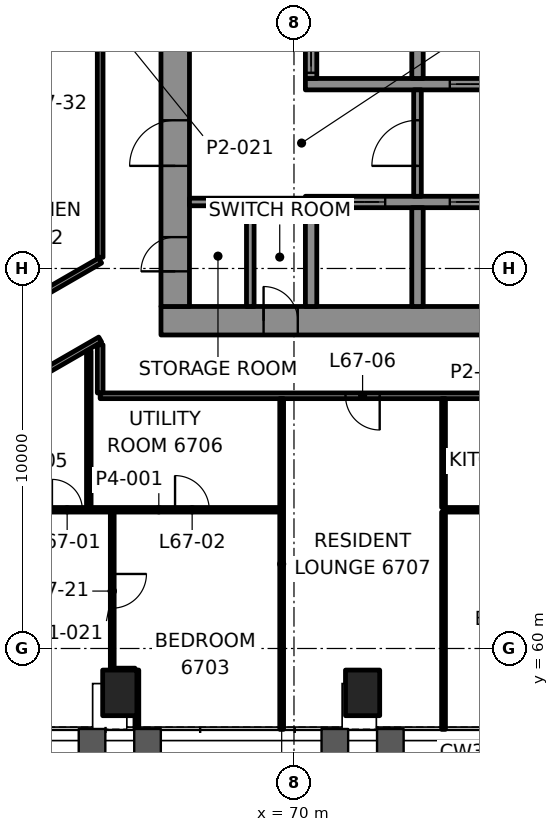
"""IFC4 building model, lengths in metres.
Left out: names, types, materials, properties, quantities, classifications, styles, units other than length and angle.
Written with IfcOpenShell. Run it as: python <this file> out.ifc"""

import sys

from ifc_helpers import new_model, si_unit, direction, frame, frame_2d, origin, origin_2d, place, context, subcontext, project, spatial, rectangle, hollow_rectangle, extrude, element, fill, save


model = new_model("IFC4")
c1 = context("Model", 3, precision=1e-05, world=origin(), true_north=direction((0.0, 1.0)))
c2 = subcontext(c1, "Body", "Model", "MODEL_VIEW")
j1 = project(units=[si_unit("LENGTHUNIT", "METRE"), si_unit("PLANEANGLEUNIT", "RADIAN")], contexts=[c1])
p1 = place(None, origin())
s1 = spatial("IfcSite", under=j1, at=p1, CompositionType="ELEMENT")
p2 = place(p1, origin())
s2 = spatial("IfcBuilding", under=s1, at=p2, CompositionType="ELEMENT")
p3 = place(p2, frame((0.0, 0.0, 281.1)))
s3 = spatial("IfcBuildingStorey", under=s2, at=p3, CompositionType="ELEMENT", Elevation=281.1)
for number, where, z_axis, x_axis in (
    (1, (65.416, 58.832, -0.0), (0.0, 0.0, 1.0), (1.0, 0.0, 0.0)),
    (2, (71.805, 58.832, -0.0), (0.0, 0.0, 1.0), (1.0, 0.0, 0.0)),
):
    element("IfcColumn", number, at=place(p3, frame(where, z_axis=z_axis, x_axis=x_axis)), inside=s3, PredefinedType="COLUMN", context=c2, shape_type="SweptSolid", body=[
        extrude(hollow_rectangle(XDim=0.9, YDim=1.2, WallThickness=0.06, at=origin_2d()), origin(), (0.0, 0.0, 1.0), 3.5),
    ])
p4 = place(p3, frame((66.5, 68.625, 0.0), z_axis=(0.0, 0.0, 1.0), x_axis=(1.0, 0.0, 0.0)))
e3 = element("IfcWall", 3, at=p4, inside=s3, PredefinedType="SHEAR", context=c2, shape_type="SweptSolid", body=[
    extrude(rectangle(XDim=17.0, YDim=0.75, at=frame_2d((8.5, 0.0))), origin(), (0.0, 0.0, 1.0), 3.3),
])
p5 = place(p4, frame((2.7, 0.0, 0.0)))
e4 = element("IfcOpeningElement", 4, at=p5, cuts=e3, PredefinedType="OPENING", context=c2, shape_type="SweptSolid", body=[
    extrude(rectangle(XDim=0.9, YDim=2.1, at=frame_2d((0.45, 1.05))), frame((0.0, 0.385, 0.0), z_axis=(0.0, -1.0, 0.0), x_axis=(1.0, 0.0, 0.0)), (0.0, 0.0, 1.0), 0.77),
])
p6 = place(p3, frame((66.875, 69.0, 0.0), z_axis=(0.0, 0.0, 1.0), x_axis=(0.0, 1.0, 0.0)))
e5 = element("IfcWall", 5, at=p6, inside=s3, PredefinedType="SHEAR", context=c2, shape_type="SweptSolid", body=[
    extrude(rectangle(XDim=12.0, YDim=0.75, at=frame_2d((6.0, 0.0))), origin(), (0.0, 0.0, 1.0), 3.3),
])
p7 = place(p6, frame((3.7, 0.0, 0.0)))
e6 = element("IfcOpeningElement", 6, at=p7, cuts=e5, PredefinedType="OPENING", context=c2, shape_type="SweptSolid", body=[
    extrude(rectangle(XDim=1.2, YDim=2.1, at=frame_2d((0.6, 1.05))), frame((0.0, 0.385, 0.0), z_axis=(0.0, -1.0, 0.0), x_axis=(1.0, 0.0, 0.0)), (0.0, 0.0, 1.0), 0.77),
])
p8 = place(p6, frame((0.925, 0.0, 0.0)))
e7 = element("IfcOpeningElement", 7, at=p8, cuts=e5, PredefinedType="OPENING", context=c2, shape_type="SweptSolid", body=[
    extrude(rectangle(XDim=0.9, YDim=2.1, at=frame_2d((0.45, 1.05))), frame((0.0, 0.385, 0.0), z_axis=(0.0, -1.0, 0.0), x_axis=(1.0, 0.0, 0.0)), (0.0, 0.0, 1.0), 0.77),
])
p9 = place(p3, frame((70.3, 71.75, 0.0), z_axis=(0.0, 0.0, 1.0), x_axis=(1.0, 0.0, 0.0)))
e8 = element("IfcWall", 8, at=p9, inside=s3, PredefinedType="SHEAR", context=c2, shape_type="SweptSolid", body=[
    extrude(rectangle(XDim=11.5, YDim=0.3, at=frame_2d((5.75, 0.0))), origin(), (0.0, 0.0, 1.0), 3.3),
])
p10 = place(p9, frame((1.0, 0.0, 0.0)))
e9 = element("IfcOpeningElement", 9, at=p10, cuts=e8, PredefinedType="OPENING", context=c2, shape_type="SweptSolid", body=[
    extrude(rectangle(XDim=1.1, YDim=2.1, at=frame_2d((0.55, 1.05))), frame((0.0, 0.16, 0.0), z_axis=(0.0, -1.0, 0.0), x_axis=(1.0, 0.0, 0.0)), (0.0, 0.0, 1.0), 0.32),
])
p11 = place(p9, frame((3.8, 0.0, 0.0)))
e10 = element("IfcOpeningElement", 10, at=p11, cuts=e8, PredefinedType="OPENING", context=c2, shape_type="SweptSolid", body=[
    extrude(rectangle(XDim=1.1, YDim=2.1, at=frame_2d((0.55, 1.05))), frame((0.0, 0.16, 0.0), z_axis=(0.0, -1.0, 0.0), x_axis=(1.0, 0.0, 0.0)), (0.0, 0.0, 1.0), 0.32),
])
p12 = place(p9, frame((6.6, 0.0, 0.0)))
e11 = element("IfcOpeningElement", 11, at=p12, cuts=e8, PredefinedType="OPENING", context=c2, shape_type="SweptSolid", body=[
    extrude(rectangle(XDim=1.1, YDim=2.1, at=frame_2d((0.55, 1.05))), frame((0.0, 0.16, 0.0), z_axis=(0.0, -1.0, 0.0), x_axis=(1.0, 0.0, 0.0)), (0.0, 0.0, 1.0), 0.32),
])
p13 = place(p9, frame((9.4, 0.0, 0.0)))
e12 = element("IfcOpeningElement", 12, at=p13, cuts=e8, PredefinedType="OPENING", context=c2, shape_type="SweptSolid", body=[
    extrude(rectangle(XDim=1.1, YDim=2.1, at=frame_2d((0.55, 1.05))), frame((0.0, 0.16, 0.0), z_axis=(0.0, -1.0, 0.0), x_axis=(1.0, 0.0, 0.0)), (0.0, 0.0, 1.0), 0.32),
])
p14 = place(p3, frame((70.3, 74.85, 0.0), z_axis=(0.0, 0.0, 1.0), x_axis=(1.0, 0.0, 0.0)))
e13 = element("IfcWall", 13, at=p14, inside=s3, PredefinedType="SHEAR", context=c2, shape_type="SweptSolid", body=[
    extrude(rectangle(XDim=5.9, YDim=0.3, at=frame_2d((2.95, 0.0))), origin(), (0.0, 0.0, 1.0), 3.3),
])
p15 = place(p14, frame((3.8, 0.0, 0.0)))
e14 = element("IfcOpeningElement", 14, at=p15, cuts=e13, PredefinedType="OPENING", context=c2, shape_type="SweptSolid", body=[
    extrude(rectangle(XDim=1.1, YDim=2.1, at=frame_2d((0.55, 1.05))), frame((0.0, 0.16, 0.0), z_axis=(0.0, -1.0, 0.0), x_axis=(1.0, 0.0, 0.0)), (0.0, 0.0, 1.0), 0.32),
])
p16 = place(p3, frame((70.45, 69.0, 0.0), z_axis=(0.0, 0.0, 1.0), x_axis=(0.0, 1.0, 0.0)))
e15 = element("IfcWall", 15, at=p16, inside=s3, PredefinedType="SHEAR", context=c2, shape_type="SweptSolid", body=[
    extrude(rectangle(XDim=2.6, YDim=0.3, at=frame_2d((1.3, 0.0))), origin(), (0.0, 0.0, 1.0), 3.3),
])
p17 = place(p3, frame((70.45, 75.0, 0.0), z_axis=(0.0, 0.0, 1.0), x_axis=(0.0, 1.0, 0.0)))
e16 = element("IfcWall", 16, at=p17, inside=s3, PredefinedType="SHEAR", context=c2, shape_type="SweptSolid", body=[
    extrude(rectangle(XDim=2.6, YDim=0.3, at=frame_2d((1.3, 0.0))), origin(), (0.0, 0.0, 1.0), 3.3),
])
p18 = place(p17, frame((0.15, 0.0, 0.0)))
e17 = element("IfcOpeningElement", 17, at=p18, cuts=e16, PredefinedType="OPENING", context=c2, shape_type="SweptSolid", body=[
    extrude(rectangle(XDim=1.1, YDim=2.1, at=frame_2d((0.55, 1.05))), frame((0.0, 0.16, 0.0), z_axis=(0.0, -1.0, 0.0), x_axis=(1.0, 0.0, 0.0)), (0.0, 0.0, 1.0), 0.32),
])
for number, where, z_axis, x_axis in (
    (18, (73.25, 69.0, 0.0), (0.0, 0.0, 1.0), (0.0, 1.0, 0.0)),
    (19, (73.25, 75.0, 0.0), (0.0, 0.0, 1.0), (0.0, 1.0, 0.0)),
):
    element("IfcWall", number, at=place(p3, frame(where, z_axis=z_axis, x_axis=x_axis)), inside=s3, PredefinedType="SHEAR", context=c2, shape_type="SweptSolid", body=[
        extrude(rectangle(XDim=2.6, YDim=0.3, at=frame_2d((1.3, 0.0))), origin(), (0.0, 0.0, 1.0), 3.3),
    ])
p19 = place(p3, frame((65.268, 59.432, 0.0), z_axis=(0.0, 0.0, 1.0), x_axis=(1.0, 0.0, 0.0)))
e20 = element("IfcWall", 20, at=p19, inside=s3, PredefinedType="PARTITIONING", context=c2, shape_type="SweptSolid", body=[
    extrude(rectangle(XDim=0.548, YDim=0.1, at=frame_2d((0.274, 0.0))), origin(), (0.0, 0.0, 1.0), 2.7),
])
p20 = place(p3, frame((63.261, 63.65, 0.0), z_axis=(0.0, 0.0, 1.0), x_axis=(1.0, 0.0, 0.0)))
e21 = element("IfcWall", 21, at=p20, inside=s3, PredefinedType="PARTITIONING", context=c2, shape_type="SweptSolid", body=[
    extrude(rectangle(XDim=6.364, YDim=0.12, at=frame_2d((3.182, 0.0))), origin(), (0.0, 0.0, 1.0), 2.7),
])
p21 = place(p20, frame((0.37, 0.0, 0.0)))
e22 = element("IfcOpeningElement", 22, at=p21, cuts=e21, PredefinedType="OPENING", context=c2, shape_type="SweptSolid", body=[
    extrude(rectangle(XDim=0.8, YDim=2.1, at=frame_2d((0.4, 1.05))), frame((0.0, 0.07, 0.0), z_axis=(0.0, -1.0, 0.0), x_axis=(1.0, 0.0, 0.0)), (0.0, 0.0, 1.0), 0.14),
])
p22 = place(p20, frame((3.609, 0.0, 0.0)))
e23 = element("IfcOpeningElement", 23, at=p22, cuts=e21, PredefinedType="OPENING", context=c2, shape_type="SweptSolid", body=[
    extrude(rectangle(XDim=0.9, YDim=2.1, at=frame_2d((0.45, 1.05))), frame((0.0, 0.07, 0.0), z_axis=(0.0, -1.0, 0.0), x_axis=(1.0, 0.0, 0.0)), (0.0, 0.0, 1.0), 0.14),
])
p23 = place(p3, frame((73.935, 63.65, 0.0), z_axis=(0.0, 0.0, 1.0), x_axis=(1.0, 0.0, 0.0)))
e24 = element("IfcWall", 24, at=p23, inside=s3, PredefinedType="PARTITIONING", context=c2, shape_type="SweptSolid", body=[
    extrude(rectangle(XDim=12.924, YDim=0.12, at=frame_2d((6.462, 0.0))), origin(), (0.0, 0.0, 1.0), 2.7),
])
p24 = place(p23, frame((6.197, 0.0, 0.0)))
e25 = element("IfcOpeningElement", 25, at=p24, cuts=e24, PredefinedType="OPENING", context=c2, shape_type="SweptSolid", body=[
    extrude(rectangle(XDim=0.9, YDim=2.1, at=frame_2d((0.45, 1.05))), frame((0.0, 0.07, 0.0), z_axis=(0.0, -1.0, 0.0), x_axis=(1.0, 0.0, 0.0)), (0.0, 0.0, 1.0), 0.14),
])
p25 = place(p23, frame((9.995, 0.0, 0.0)))
e26 = element("IfcOpeningElement", 26, at=p25, cuts=e24, PredefinedType="OPENING", context=c2, shape_type="SweptSolid", body=[
    extrude(rectangle(XDim=0.8, YDim=2.1, at=frame_2d((0.4, 1.05))), frame((0.0, 0.07, 0.0), z_axis=(0.0, -1.0, 0.0), x_axis=(1.0, 0.0, 0.0)), (0.0, 0.0, 1.0), 0.14),
])
p26 = place(p3, frame((85.1, 66.65, 0.0), z_axis=(0.0, 0.0, 1.0), x_axis=(-1.0, 0.0, 0.0)))
e27 = element("IfcWall", 27, at=p26, inside=s3, PredefinedType="PARTITIONING", context=c2, shape_type="SweptSolid", body=[
    extrude(rectangle(XDim=20.2, YDim=0.15, at=frame_2d((10.1, 0.0))), origin(), (0.0, 0.0, 1.0), 2.7),
])
p27 = place(p26, frame((6.405, 0.0, 0.0)))
e28 = element("IfcOpeningElement", 28, at=p27, cuts=e27, PredefinedType="OPENING", context=c2, shape_type="SweptSolid", body=[
    extrude(rectangle(XDim=1.0, YDim=2.1, at=frame_2d((0.5, 1.05))), frame((0.0, 0.085, 0.0), z_axis=(0.0, -1.0, 0.0), x_axis=(1.0, 0.0, 0.0)), (0.0, 0.0, 1.0), 0.17),
])
p28 = place(p26, frame((12.845, 0.0, 0.0)))
e29 = element("IfcOpeningElement", 29, at=p28, cuts=e27, PredefinedType="OPENING", context=c2, shape_type="SweptSolid", body=[
    extrude(rectangle(XDim=0.9, YDim=2.1, at=frame_2d((0.45, 1.05))), frame((0.0, 0.085, 0.0), z_axis=(0.0, -1.0, 0.0), x_axis=(1.0, 0.0, 0.0)), (0.0, 0.0, 1.0), 0.17),
])
p29 = place(p3, frame((64.9, 68.13, 0.0), z_axis=(0.0, 0.0, 1.0), x_axis=(-0.866023199005, -0.500003818771, 0.0)))
e30 = element("IfcWall", 30, at=p29, inside=s3, PredefinedType="PARTITIONING", context=c2, shape_type="SweptSolid", body=[
    extrude(rectangle(XDim=12.719, YDim=0.15, at=frame_2d((6.359, 0.0))), origin(), (0.0, 0.0, 1.0), 2.547),
])
p30 = place(p29, frame((8.364, 0.0, 0.0)))
e31 = element("IfcOpeningElement", 31, at=p30, cuts=e30, PredefinedType="OPENING", context=c2, shape_type="SweptSolid", body=[
    extrude(rectangle(XDim=1.0, YDim=2.1, at=frame_2d((0.5, 1.05))), frame((0.0, 0.085, 0.0), z_axis=(0.0, -1.0, 0.0), x_axis=(1.0, 0.0, 0.0)), (0.0, 0.0, 1.0), 0.17),
])
p31 = place(p3, frame((52.986, 63.329, 0.0), z_axis=(0.0, 0.0, 1.0), x_axis=(0.866027482275, 0.499996399932, 0.0)))
e32 = element("IfcWall", 32, at=p31, inside=s3, PredefinedType="PARTITIONING", context=c2, shape_type="SweptSolid", body=[
    extrude(rectangle(XDim=13.757, YDim=0.15, at=frame_2d((6.879, 0.0))), origin(), (0.0, 0.0, 1.0), 2.7),
])
p32 = place(p31, frame((2.62, 0.0, 0.0)))
e33 = element("IfcOpeningElement", 33, at=p32, cuts=e32, PredefinedType="OPENING", context=c2, shape_type="SweptSolid", body=[
    extrude(rectangle(XDim=0.9, YDim=2.1, at=frame_2d((0.45, 1.05))), frame((0.0, 0.085, 0.0), z_axis=(0.0, -1.0, 0.0), x_axis=(1.0, 0.0, 0.0)), (0.0, 0.0, 1.0), 0.17),
])
p33 = place(p3, frame((73.935, 57.872, 0.0), z_axis=(0.0, 0.0, 1.0), x_axis=(0.0, 1.0, 0.0)))
e34 = element("IfcWall", 34, at=p33, inside=s3, PredefinedType="PARTITIONING", context=c2, shape_type="SweptSolid", body=[
    extrude(rectangle(XDim=5.718, YDim=0.1, at=frame_2d((2.859, 0.0))), origin(), (0.0, 0.0, 1.0), 2.688),
])
p34 = place(p3, frame((69.676, 57.872, 0.0), z_axis=(0.0, 0.0, 1.0), x_axis=(0.0, 1.0, 0.0)))
e35 = element("IfcWall", 35, at=p34, inside=s3, PredefinedType="PARTITIONING", context=c2, shape_type="SweptSolid", body=[
    extrude(rectangle(XDim=8.703, YDim=0.1, at=frame_2d((4.352, 0.0))), origin(), (0.0, 0.0, 1.0), 2.688),
])
p35 = place(p3, frame((65.866, 57.872, 0.0), z_axis=(0.0, 0.0, 1.0), x_axis=(0.0, 1.0, 0.0)))
e36 = element("IfcWall", 36, at=p35, inside=s3, PredefinedType="PARTITIONING", context=c2, shape_type="SweptSolid", body=[
    extrude(rectangle(XDim=1.56, YDim=0.1, at=frame_2d((0.78, 0.0))), origin(), (0.0, 0.0, 1.0), 2.688),
])
p36 = place(p3, frame((65.218, 63.59, 0.0), z_axis=(0.0, 0.0, 1.0), x_axis=(0.0, -1.0, 0.0)))
e37 = element("IfcWall", 37, at=p36, inside=s3, PredefinedType="PARTITIONING", context=c2, shape_type="SweptSolid", body=[
    extrude(rectangle(XDim=4.158, YDim=0.1, at=frame_2d((2.079, 0.0))), origin(), (0.0, 0.0, 1.0), 2.7),
])
p37 = place(p36, frame((1.629, 0.0, 0.0)))
e38 = element("IfcOpeningElement", 38, at=p37, cuts=e37, PredefinedType="OPENING", context=c2, shape_type="SweptSolid", body=[
    extrude(rectangle(XDim=0.9, YDim=2.1, at=frame_2d((0.45, 1.05))), frame((0.0, 0.06, 0.0), z_axis=(0.0, -1.0, 0.0), x_axis=(1.0, 0.0, 0.0)), (0.0, 0.0, 1.0), 0.12),
])
p38 = place(p3, frame((64.9, 66.725, 0.0), z_axis=(0.0, 0.0, 1.0), x_axis=(0.0, 1.0, 0.0)))
e39 = element("IfcWall", 39, at=p38, inside=s3, PredefinedType="PARTITIONING", context=c2, shape_type="SweptSolid", body=[
    extrude(rectangle(XDim=1.268, YDim=0.15, at=frame_2d((0.634, 0.0))), origin(), (0.0, 0.0, 1.0), 2.547),
])
p39 = place(p3, frame((64.9, 70.295, 0.0), z_axis=(0.0, 0.0, 1.0), x_axis=(0.0, 1.0, 0.0)))
e40 = element("IfcWall", 40, at=p39, inside=s3, PredefinedType="PARTITIONING", context=c2, shape_type="SweptSolid", body=[
    extrude(rectangle(XDim=13.055, YDim=0.15, at=frame_2d((6.528, 0.0))), origin(), (0.0, 0.0, 1.0), 2.7),
])
p40 = place(p39, frame((8.07, 0.0, 0.0)))
e41 = element("IfcOpeningElement", 41, at=p40, cuts=e40, PredefinedType="OPENING", context=c2, shape_type="SweptSolid", body=[
    extrude(rectangle(XDim=1.0, YDim=2.1, at=frame_2d((0.5, 1.05))), frame((0.0, 0.085, 0.0), z_axis=(0.0, -1.0, 0.0), x_axis=(1.0, 0.0, 0.0)), (0.0, 0.0, 1.0), 0.17),
])
p41 = place(p3, frame((64.601, 63.71, 0.0), z_axis=(0.0, 0.0, 1.0), x_axis=(0.0, 1.0, 0.0)))
e42 = element("IfcWall", 42, at=p41, inside=s3, PredefinedType="PARTITIONING", context=c2, shape_type="SweptSolid", body=[
    extrude(rectangle(XDim=4.12, YDim=0.12, at=frame_2d((2.06, 0.0))), origin(), (0.0, 0.0, 1.0), 2.547),
])
p42 = place(p3, frame((73.935, 63.71, 0.0), z_axis=(0.0, 0.0, 1.0), x_axis=(0.0, 1.0, 0.0)))
e43 = element("IfcWall", 43, at=p42, inside=s3, PredefinedType="PARTITIONING", context=c2, shape_type="SweptSolid", body=[
    extrude(rectangle(XDim=2.865, YDim=0.1, at=frame_2d((1.433, 0.0))), origin(), (0.0, 0.0, 1.0), 2.7),
])
p43 = place(p3, frame((67.25, 71.75, 0.0), z_axis=(0.0, 0.0, 1.0), x_axis=(1.0, 0.0, 0.0)))
e44 = element("IfcWall", 44, at=p43, inside=s3, PredefinedType="PARTITIONING", context=c2, shape_type="SweptSolid", body=[
    extrude(rectangle(XDim=3.05, YDim=0.2, at=frame_2d((1.525, 0.0))), origin(), (0.0, 0.0, 1.0), 3.3),
])
p44 = place(p3, frame((68.85, 69.0, 0.0), z_axis=(0.0, 0.0, 1.0), x_axis=(0.0, 1.0, 0.0)))
e45 = element("IfcWall", 45, at=p44, inside=s3, PredefinedType="PARTITIONING", context=c2, shape_type="SweptSolid", body=[
    extrude(rectangle(XDim=2.65, YDim=0.2, at=frame_2d((1.325, 0.0))), origin(), (0.0, 0.0, 1.0), 3.3),
])
p45 = place(p3, frame((73.25, 71.9, 0.0), z_axis=(0.0, 0.0, 1.0), x_axis=(0.0, 1.0, 0.0)))
e46 = element("IfcWall", 46, at=p45, inside=s3, PredefinedType="PARTITIONING", context=c2, shape_type="SweptSolid", body=[
    extrude(rectangle(XDim=2.8, YDim=0.2, at=frame_2d((1.4, 0.0))), origin(), (0.0, 0.0, 1.0), 3.3),
])
p46 = place(p45, frame((0.8, 0.0, 0.0)))
e47 = element("IfcOpeningElement", 47, at=p46, cuts=e46, PredefinedType="OPENING", context=c2, shape_type="SweptSolid", body=[
    extrude(rectangle(XDim=1.2, YDim=2.1, at=frame_2d((0.6, 1.05))), frame((0.0, 0.11, 0.0), z_axis=(0.0, -1.0, 0.0), x_axis=(1.0, 0.0, 0.0)), (0.0, 0.0, 1.0), 0.22),
])
p47 = place(p21, origin())
e48 = element("IfcDoor", 48, at=p47, inside=s3, OperationType="SINGLE_SWING_RIGHT", PredefinedType="DOOR", context=c2, shape_type="SweptSolid", body=[
    extrude(rectangle(XDim=0.8, YDim=2.1, at=frame_2d((0.4, 1.05))), frame((0.0, 0.025, 0.0), z_axis=(0.0, -1.0, 0.0), x_axis=(1.0, 0.0, 0.0)), (0.0, 0.0, 1.0), 0.05),
])
fill(e22, e48)
p48 = place(p22, origin())
e49 = element("IfcDoor", 49, at=p48, inside=s3, OperationType="SINGLE_SWING_LEFT", PredefinedType="DOOR", context=c2, shape_type="SweptSolid", body=[
    extrude(rectangle(XDim=0.9, YDim=2.1, at=frame_2d((0.45, 1.05))), frame((0.0, 0.025, 0.0), z_axis=(0.0, -1.0, 0.0), x_axis=(1.0, 0.0, 0.0)), (0.0, 0.0, 1.0), 0.05),
])
fill(e23, e49)
p49 = place(p28, origin())
e50 = element("IfcDoor", 50, at=p49, inside=s3, OperationType="SINGLE_SWING_LEFT", PredefinedType="DOOR", context=c2, shape_type="SweptSolid", body=[
    extrude(rectangle(XDim=0.9, YDim=2.1, at=frame_2d((0.45, 1.05))), frame((0.0, 0.025, 0.0), z_axis=(0.0, -1.0, 0.0), x_axis=(1.0, 0.0, 0.0)), (0.0, 0.0, 1.0), 0.05),
])
fill(e29, e50)
p50 = place(p37, origin())
e51 = element("IfcDoor", 51, at=p50, inside=s3, OperationType="SINGLE_SWING_RIGHT", PredefinedType="DOOR", context=c2, shape_type="SweptSolid", body=[
    extrude(rectangle(XDim=0.9, YDim=2.1, at=frame_2d((0.45, 1.05))), frame((0.0, 0.025, 0.0), z_axis=(0.0, -1.0, 0.0), x_axis=(1.0, 0.0, 0.0)), (0.0, 0.0, 1.0), 0.05),
])
fill(e38, e51)
p51 = place(p10, origin())
e52 = element("IfcDoor", 52, at=p51, inside=s3, OperationType="DOUBLE_DOOR_SLIDING", PredefinedType="DOOR", context=c2, shape_type="SweptSolid", body=[
    extrude(rectangle(XDim=1.1, YDim=2.1, at=frame_2d((0.55, 1.05))), frame((0.0, 0.025, 0.0), z_axis=(0.0, -1.0, 0.0), x_axis=(1.0, 0.0, 0.0)), (0.0, 0.0, 1.0), 0.05),
])
fill(e9, e52)
p52 = place(p11, origin())
e53 = element("IfcDoor", 53, at=p52, inside=s3, OperationType="DOUBLE_DOOR_SLIDING", PredefinedType="DOOR", context=c2, shape_type="SweptSolid", body=[
    extrude(rectangle(XDim=1.1, YDim=2.1, at=frame_2d((0.55, 1.05))), frame((0.0, 0.025, 0.0), z_axis=(0.0, -1.0, 0.0), x_axis=(1.0, 0.0, 0.0)), (0.0, 0.0, 1.0), 0.05),
])
fill(e10, e53)
p53 = place(p18, origin())
e54 = element("IfcDoor", 54, at=p53, inside=s3, OperationType="DOUBLE_DOOR_SLIDING", PredefinedType="DOOR", context=c2, shape_type="SweptSolid", body=[
    extrude(rectangle(XDim=1.1, YDim=2.1, at=frame_2d((0.55, 1.05))), frame((0.0, 0.025, 0.0), z_axis=(0.0, -1.0, 0.0), x_axis=(1.0, 0.0, 0.0)), (0.0, 0.0, 1.0), 0.05),
])
fill(e17, e54)
p54 = place(p15, origin())
e55 = element("IfcDoor", 55, at=p54, inside=s3, OperationType="DOUBLE_DOOR_SLIDING", PredefinedType="DOOR", context=c2, shape_type="SweptSolid", body=[
    extrude(rectangle(XDim=1.1, YDim=2.1, at=frame_2d((0.55, 1.05))), frame((0.0, 0.025, 0.0), z_axis=(0.0, -1.0, 0.0), x_axis=(1.0, 0.0, 0.0)), (0.0, 0.0, 1.0), 0.05),
])
fill(e14, e55)
p55 = place(p46, origin())
e56 = element("IfcDoor", 56, at=p55, inside=s3, OperationType="SINGLE_SWING_LEFT", PredefinedType="DOOR", context=c2, shape_type="SweptSolid", body=[
    extrude(rectangle(XDim=1.2, YDim=2.1, at=frame_2d((0.6, 1.05))), frame((0.0, 0.025, 0.0), z_axis=(0.0, -1.0, 0.0), x_axis=(1.0, 0.0, 0.0)), (0.0, 0.0, 1.0), 0.05),
])
fill(e47, e56)
p56 = place(p7, origin())
e57 = element("IfcDoor", 57, at=p56, inside=s3, OperationType="SINGLE_SWING_RIGHT", PredefinedType="DOOR", context=c2, shape_type="SweptSolid", body=[
    extrude(rectangle(XDim=1.2, YDim=2.1, at=frame_2d((0.6, 1.05))), frame((0.0, 0.095, 0.0), z_axis=(0.0, -1.0, 0.0), x_axis=(1.0, 0.0, 0.0)), (0.0, 0.0, 1.0), 0.19),
])
fill(e6, e57)
p57 = place(p8, origin())
e58 = element("IfcDoor", 58, at=p57, inside=s3, OperationType="SINGLE_SWING_RIGHT", PredefinedType="DOOR", context=c2, shape_type="SweptSolid", body=[
    extrude(rectangle(XDim=0.9, YDim=2.1, at=frame_2d((0.45, 1.05))), frame((0.0, 0.095, 0.0), z_axis=(0.0, -1.0, 0.0), x_axis=(1.0, 0.0, 0.0)), (0.0, 0.0, 1.0), 0.19),
])
fill(e7, e58)
p58 = place(p5, origin())
e59 = element("IfcDoor", 59, at=p58, inside=s3, OperationType="SINGLE_SWING_LEFT", PredefinedType="DOOR", context=c2, shape_type="SweptSolid", body=[
    extrude(rectangle(XDim=0.9, YDim=2.1, at=frame_2d((0.45, 1.05))), frame((0.0, 0.095, 0.0), z_axis=(0.0, -1.0, 0.0), x_axis=(1.0, 0.0, 0.0)), (0.0, 0.0, 1.0), 0.19),
])
fill(e4, e59)
save(model, sys.argv[1])
